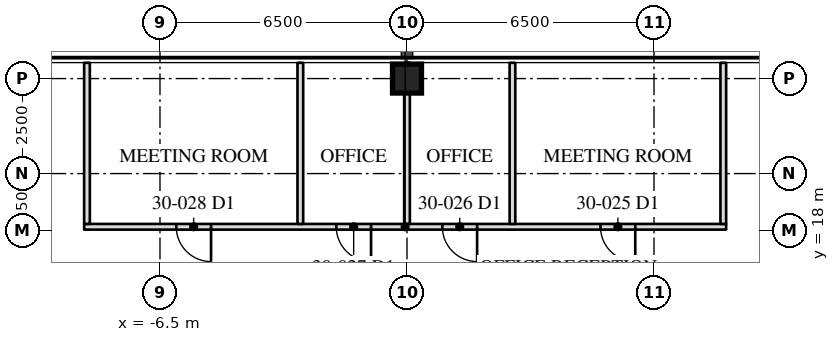
"""IFC4 building model, lengths in metres.
Left out: names, types, materials, properties, quantities, classifications, styles, units other than length and angle.
Written with IfcOpenShell. Run it as: python <this file> out.ifc"""

import sys

from ifc_helpers import new_model, si_unit, direction, frame, frame_2d, origin, origin_2d, place, context, subcontext, project, spatial, rectangle, hollow_rectangle, extrude, element, fill, save


model = new_model("IFC4")
c1 = context("Model", 3, precision=1e-05, world=origin(), true_north=direction((0.0, 1.0)))
c2 = subcontext(c1, "Body", "Model", "MODEL_VIEW")
j1 = project(units=[si_unit("LENGTHUNIT", "METRE"), si_unit("PLANEANGLEUNIT", "RADIAN")], contexts=[c1])
p1 = place(None, origin())
s1 = spatial("IfcSite", under=j1, at=p1, CompositionType="ELEMENT")
p2 = place(p1, origin())
s2 = spatial("IfcBuilding", under=s1, at=p2, CompositionType="ELEMENT")
p3 = place(p2, frame((0.0, 0.0, 129.5)))
s3 = spatial("IfcBuildingStorey", under=s2, at=p3, CompositionType="ELEMENT", Elevation=129.5)
p4 = place(p3, frame((0.0, 22.0, 0.0), z_axis=(0.0, 0.0, 1.0), x_axis=(1.0, 0.0, 0.0)))
e1 = element("IfcColumn", 1, at=p4, inside=s3, PredefinedType="COLUMN", context=c2, shape_type="SweptSolid", body=[
    extrude(hollow_rectangle(XDim=0.762, YDim=0.762, WallThickness=0.076, at=origin_2d()), origin(), (0.0, 0.0, 1.0), 4.1),
])
p5 = place(p3, frame((8.398, 18.1, 0.0), z_axis=(0.0, 0.0, 1.0), x_axis=(-1.0, 0.0, 0.0)))
e2 = element("IfcWall", 2, at=p5, inside=s3, PredefinedType="PARTITIONING", context=c2, shape_type="SweptSolid", body=[
    extrude(rectangle(XDim=16.894, YDim=0.15, at=frame_2d((8.447, 0.0))), origin(), (0.0, 0.0, 1.0), 3.91),
])
p6 = place(p5, frame((2.392, 0.0, 0.0)))
e3 = element("IfcOpeningElement", 3, at=p6, cuts=e2, PredefinedType="OPENING", context=c2, shape_type="SweptSolid", body=[
    extrude(rectangle(XDim=0.915, YDim=2.134, at=frame_2d((0.458, 1.067))), frame((0.0, 0.085, 0.0), z_axis=(0.0, -1.0, 0.0), x_axis=(1.0, 0.0, 0.0)), (0.0, 0.0, 1.0), 0.17),
])
p7 = place(p5, frame((6.553, 0.0, 0.0)))
e4 = element("IfcOpeningElement", 4, at=p7, cuts=e2, PredefinedType="OPENING", context=c2, shape_type="SweptSolid", body=[
    extrude(rectangle(XDim=0.915, YDim=2.134, at=frame_2d((0.458, 1.067))), frame((0.0, 0.085, 0.0), z_axis=(0.0, -1.0, 0.0), x_axis=(1.0, 0.0, 0.0)), (0.0, 0.0, 1.0), 0.17),
])
p8 = place(p5, frame((9.344, 0.0, 0.0)))
e5 = element("IfcOpeningElement", 5, at=p8, cuts=e2, PredefinedType="OPENING", context=c2, shape_type="SweptSolid", body=[
    extrude(rectangle(XDim=0.915, YDim=2.134, at=frame_2d((0.458, 1.067))), frame((0.0, 0.085, 0.0), z_axis=(0.0, -1.0, 0.0), x_axis=(1.0, 0.0, 0.0)), (0.0, 0.0, 1.0), 0.17),
])
p9 = place(p5, frame((13.554, 0.0, 0.0)))
e6 = element("IfcOpeningElement", 6, at=p9, cuts=e2, PredefinedType="OPENING", context=c2, shape_type="SweptSolid", body=[
    extrude(rectangle(XDim=0.915, YDim=2.134, at=frame_2d((0.458, 1.067))), frame((0.0, 0.085, 0.0), z_axis=(0.0, -1.0, 0.0), x_axis=(1.0, 0.0, 0.0)), (0.0, 0.0, 1.0), 0.17),
])
for number, where, z_axis, x_axis in (
    (7, (8.323, 18.175, 0.0), (0.0, 0.0, 1.0), (0.0, 1.0, 0.0)),
    (8, (2.775, 18.175, 0.0), (0.0, 0.0, 1.0), (0.0, 1.0, 0.0)),
):
    element("IfcWall", number, at=place(p3, frame(where, z_axis=z_axis, x_axis=x_axis)), inside=s3, PredefinedType="PARTITIONING", context=c2, shape_type="SweptSolid", body=[
        extrude(rectangle(XDim=4.24, YDim=0.15, at=frame_2d((2.12, 0.0))), origin(), (0.0, 0.0, 1.0), 3.91),
    ])
p10 = place(p3, frame((0.0, 18.175, 0.0), z_axis=(0.0, 0.0, 1.0), x_axis=(0.0, 1.0, 0.0)))
e9 = element("IfcWall", 9, at=p10, inside=s3, PredefinedType="PARTITIONING", context=c2, shape_type="SweptSolid", body=[
    extrude(rectangle(XDim=4.24, YDim=0.15, at=frame_2d((2.12, 0.0))), origin(), (0.0, 0.0, 1.0), 3.326),
])
for number, where, z_axis, x_axis in (
    (10, (-2.807, 18.175, 0.0), (0.0, 0.0, 1.0), (0.0, 1.0, 0.0)),
    (11, (-8.421, 18.175, 0.0), (0.0, 0.0, 1.0), (0.0, 1.0, 0.0)),
):
    element("IfcWall", number, at=place(p3, frame(where, z_axis=z_axis, x_axis=x_axis)), inside=s3, PredefinedType="PARTITIONING", context=c2, shape_type="SweptSolid", body=[
        extrude(rectangle(XDim=4.24, YDim=0.15, at=frame_2d((2.12, 0.0))), origin(), (0.0, 0.0, 1.0), 3.91),
    ])
p11 = place(p6, origin())
e12 = element("IfcDoor", 12, at=p11, inside=s3, OperationType="SINGLE_SWING_LEFT", PredefinedType="DOOR", context=c2, shape_type="SweptSolid", body=[
    extrude(rectangle(XDim=0.915, YDim=2.134, at=frame_2d((0.458, 1.067))), frame((0.0, 0.025, 0.0), z_axis=(0.0, -1.0, 0.0), x_axis=(1.0, 0.0, 0.0)), (0.0, 0.0, 1.0), 0.05),
])
fill(e3, e12)
p12 = place(p7, origin())
e13 = element("IfcDoor", 13, at=p12, inside=s3, OperationType="SINGLE_SWING_LEFT", PredefinedType="DOOR", context=c2, shape_type="SweptSolid", body=[
    extrude(rectangle(XDim=0.915, YDim=2.134, at=frame_2d((0.458, 1.067))), frame((0.0, 0.025, 0.0), z_axis=(0.0, -1.0, 0.0), x_axis=(1.0, 0.0, 0.0)), (0.0, 0.0, 1.0), 0.05),
])
fill(e4, e13)
p13 = place(p8, origin())
e14 = element("IfcDoor", 14, at=p13, inside=s3, OperationType="SINGLE_SWING_LEFT", PredefinedType="DOOR", context=c2, shape_type="SweptSolid", body=[
    extrude(rectangle(XDim=0.915, YDim=2.134, at=frame_2d((0.458, 1.067))), frame((0.0, 0.025, 0.0), z_axis=(0.0, -1.0, 0.0), x_axis=(1.0, 0.0, 0.0)), (0.0, 0.0, 1.0), 0.05),
])
fill(e5, e14)
p14 = place(p9, origin())
e15 = element("IfcDoor", 15, at=p14, inside=s3, OperationType="SINGLE_SWING_LEFT", PredefinedType="DOOR", context=c2, shape_type="SweptSolid", body=[
    extrude(rectangle(XDim=0.915, YDim=2.134, at=frame_2d((0.458, 1.067))), frame((0.0, 0.025, 0.0), z_axis=(0.0, -1.0, 0.0), x_axis=(1.0, 0.0, 0.0)), (0.0, 0.0, 1.0), 0.05),
])
fill(e6, e15)
save(model, sys.argv[1])
